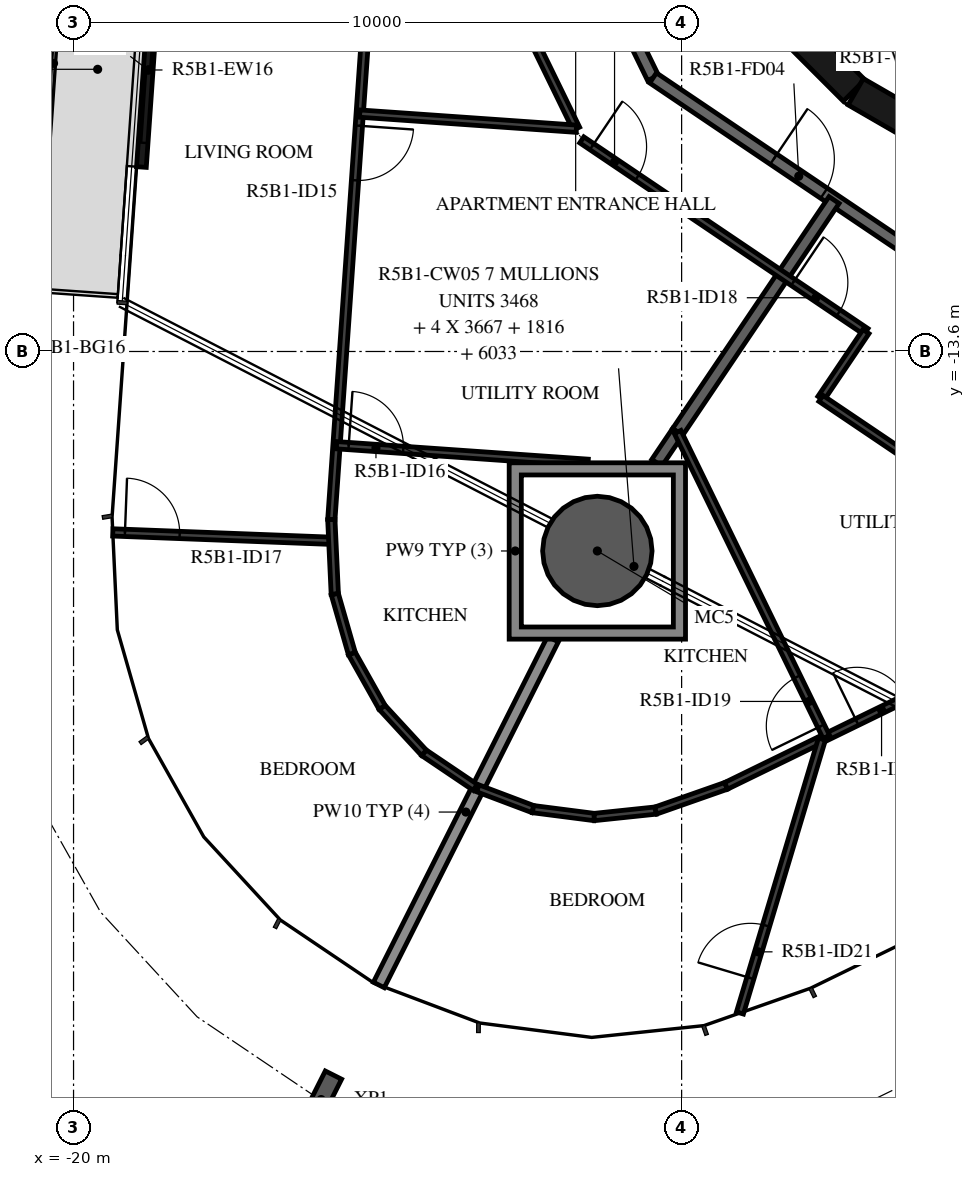
"""IFC4 building model, lengths in metres.
Left out: names, types, materials, properties, quantities, classifications, styles, units other than length and angle.
Written with IfcOpenShell. Run it as: python <this file> out.ifc"""

import sys

from ifc_helpers import new_model, si_unit, direction, frame, frame_2d, origin, origin_2d, place, context, subcontext, project, spatial, polyline, rectangle, hollow_circle, i_section, outline, extrude, element, fill, save


model = new_model("IFC4")
c1 = context("Model", 3, precision=1e-05, world=origin(), true_north=direction((0.0, 1.0)))
c2 = subcontext(c1, "Body", "Model", "MODEL_VIEW")
j1 = project(units=[si_unit("LENGTHUNIT", "METRE"), si_unit("PLANEANGLEUNIT", "RADIAN")], contexts=[c1])
p1 = place(None, origin())
s1 = spatial("IfcSite", under=j1, at=p1, CompositionType="ELEMENT")
p2 = place(p1, origin())
s2 = spatial("IfcBuilding", under=s1, at=p2, CompositionType="ELEMENT")
p3 = place(p2, frame((0.0, 0.0, 198.9)))
s3 = spatial("IfcBuildingStorey", under=s2, at=p3, CompositionType="ELEMENT", Elevation=198.9)
p4 = place(p3, frame((-11.386, -16.881, -0.38), z_axis=(0.0, 0.0, 1.0), x_axis=(1.0, 0.0, 0.0)))
e1 = element("IfcColumn", 1, at=p4, inside=s3, PredefinedType="COLUMN", context=c2, shape_type="SweptSolid", body=[
    extrude(hollow_circle(Radius=0.9, WallThickness=0.04, at=origin_2d()), origin(), (0.0, 0.0, 1.0), 3.5),
])
p5 = place(p3, frame((-15.928, -25.902, -0.38), z_axis=(0.0, 0.0, 1.0), x_axis=(-0.893169071277, 0.449721035881, 0.0)))
e2 = element("IfcColumn", 2, at=p5, inside=s3, PredefinedType="COLUMN", context=c2, shape_type="SweptSolid", body=[
    extrude(i_section(OverallWidth=0.3, OverallDepth=0.9, WebThickness=0.019, FlangeThickness=0.035, FilletRadius=0.03, at=origin_2d()), origin(), (0.0, 0.0, 1.0), 3.5),
])
p6 = place(p3, frame((-18.661, -7.375, 0.0), z_axis=(0.0, 0.0, 1.0), x_axis=(-0.069734222855, -0.997565605944, 0.0)))
e3 = element("IfcWall", 3, at=p6, inside=s3, PredefinedType="STANDARD", context=c2, shape_type="SweptSolid", body=[
    extrude(rectangle(XDim=3.2, YDim=0.16, at=frame_2d((1.6, 0.0))), origin(), (0.0, 0.0, 1.0), 3.12),
])
p7 = place(p6, frame((0.4, 0.0, 0.0)))
e4 = element("IfcOpeningElement", 4, at=p7, cuts=e3, PredefinedType="OPENING", context=c2, shape_type="SweptSolid", body=[
    extrude(rectangle(XDim=2.4, YDim=2.4, at=frame_2d((1.2, 1.2))), frame((0.0, 0.09, 0.0), z_axis=(0.0, -1.0, 0.0), x_axis=(1.0, 0.0, 0.0)), (0.0, 0.0, 1.0), 0.18),
])
p8 = place(p3, frame((-9.308, -7.164, 0.0), z_axis=(0.0, 0.0, 1.0), x_axis=(0.707106781187, -0.707106781187, 0.0)))
e5 = element("IfcWall", 5, at=p8, inside=s3, PredefinedType="SHEAR", context=c2, shape_type="SweptSolid", body=[
    extrude(rectangle(XDim=3.032, YDim=0.5, at=frame_2d((1.516, 0.0))), origin(), (0.0, 0.0, 1.0), 3.12),
])
p9 = place(p3, frame((-7.137, -9.329, 0.0), z_axis=(0.0, 0.0, 1.0), x_axis=(0.865975092491, -0.500087131594, 0.0)))
e6 = element("IfcWall", 6, at=p9, inside=s3, PredefinedType="SHEAR", context=c2, shape_type="SweptSolid", body=[
    extrude(rectangle(XDim=3.033, YDim=0.5, at=frame_2d((1.516, 0.0))), origin(), (0.0, 0.0, 1.0), 3.12),
])
p10 = place(p3, frame((-11.633, -6.716, 0.0), z_axis=(0.0, 0.0, 1.0), x_axis=(0.438322116278, -0.898817958422, 0.0)))
e7 = element("IfcWall", 7, at=p10, inside=s3, PredefinedType="STANDARD", context=c2, shape_type="SweptSolid", body=[
    extrude(rectangle(XDim=2.654, YDim=0.2, at=frame_2d((1.327, 0.0))), origin(), (0.0, 0.0, 1.0), 3.12),
])
p11 = place(p3, frame((-10.47, -9.101, 0.0), z_axis=(0.0, 0.0, 1.0), x_axis=(0.829035841718, -0.559195469534, 0.0)))
e8 = element("IfcWall", 8, at=p11, inside=s3, PredefinedType="STANDARD", context=c2, shape_type="SweptSolid", body=[
    extrude(rectangle(XDim=7.181, YDim=0.2, at=frame_2d((3.591, 0.0))), origin(), (0.0, 0.0, 1.0), 3.12),
])
p12 = place(p11, frame((2.39, 0.0, 0.0)))
e9 = element("IfcOpeningElement", 9, at=p12, cuts=e8, PredefinedType="OPENING", context=c2, shape_type="SweptSolid", body=[
    extrude(rectangle(XDim=1.0, YDim=2.1, at=frame_2d((0.5, 1.05))), frame((0.0, 0.11, 0.0), z_axis=(0.0, -1.0, 0.0), x_axis=(1.0, 0.0, 0.0)), (0.0, 0.0, 1.0), 0.22),
])
p13 = place(p3, frame((-10.066, -14.924, 0.0), z_axis=(0.0, 0.0, 1.0), x_axis=(0.559173899945, 0.829050390278, 0.0)))
e10 = element("IfcWall", 10, at=p13, inside=s3, PredefinedType="STANDARD", context=c2, shape_type="SweptSolid", body=[
    extrude(rectangle(XDim=4.601, YDim=0.2, at=frame_2d((2.301, 0.0))), origin(), (0.0, 0.0, 1.0), 3.12),
])
p14 = place(p3, frame((-10.408, -15.43, 0.0), z_axis=(0.0, 0.0, 1.0), x_axis=(0.559390561924, 0.828904215956, 0.0)))
e11 = element("IfcWall", 11, at=p14, inside=s3, PredefinedType="STANDARD", context=c2, shape_type="SweptSolid", body=[
    extrude(rectangle(XDim=0.612, YDim=0.2, at=frame_2d((0.306, 0.0))), origin(), (0.0, 0.0, 1.0), 3.12),
])
p15 = place(p3, frame((-14.979, -24.017, 0.0), z_axis=(0.0, 0.0, 1.0), x_axis=(0.449711952388, 0.893173644864, 0.0)))
e12 = element("IfcWall", 12, at=p15, inside=s3, PredefinedType="STANDARD", context=c2, shape_type="SweptSolid", body=[
    extrude(rectangle(XDim=6.367, YDim=0.2, at=frame_2d((3.184, 0.0))), origin(), (0.0, 0.0, 1.0), 2.73),
])
p16 = place(p3, frame((-14.383, -4.5, 0.0), z_axis=(0.0, 0.0, 1.0), x_axis=(0.438393414895, -0.898783185077, 0.0)))
e13 = element("IfcWall", 13, at=p16, inside=s3, PredefinedType="PARTITIONING", context=c2, shape_type="SweptSolid", body=[
    extrude(rectangle(XDim=6.049, YDim=0.12, at=frame_2d((3.024, 0.0))), origin(), (0.0, 0.0, 1.0), 3.12),
])
p17 = place(p16, frame((0.4, 0.0, 0.0)))
e14 = element("IfcOpeningElement", 14, at=p17, cuts=e13, PredefinedType="OPENING", context=c2, shape_type="SweptSolid", body=[
    extrude(rectangle(XDim=0.8, YDim=2.1, at=frame_2d((0.4, 1.05))), frame((0.0, 0.07, 0.0), z_axis=(0.0, -1.0, 0.0), x_axis=(1.0, 0.0, 0.0)), (0.0, 0.0, 1.0), 0.14),
])
p18 = place(p3, frame((-11.642, -10.12, 0.0), z_axis=(0.0, 0.0, 1.0), x_axis=(0.829033377599, -0.559199122698, 0.0)))
e15 = element("IfcWall", 15, at=p18, inside=s3, PredefinedType="PARTITIONING", context=c2, shape_type="SweptSolid", body=[
    extrude(rectangle(XDim=5.638, YDim=0.12, at=frame_2d((2.819, 0.0))), origin(), (0.0, 0.0, 1.0), 3.12),
])
p19 = place(p18, frame((0.2, 0.0, 0.0)))
e16 = element("IfcOpeningElement", 16, at=p19, cuts=e15, PredefinedType="OPENING", context=c2, shape_type="SweptSolid", body=[
    extrude(rectangle(XDim=0.9, YDim=2.1, at=frame_2d((0.45, 1.05))), frame((0.0, 0.07, 0.0), z_axis=(0.0, -1.0, 0.0), x_axis=(1.0, 0.0, 0.0)), (0.0, 0.0, 1.0), 0.14),
])
p20 = place(p18, frame((4.192, 0.0, 0.0)))
e17 = element("IfcOpeningElement", 17, at=p20, cuts=e15, PredefinedType="OPENING", context=c2, shape_type="SweptSolid", body=[
    extrude(rectangle(XDim=0.9, YDim=2.1, at=frame_2d((0.45, 1.05))), frame((0.0, 0.07, 0.0), z_axis=(0.0, -1.0, 0.0), x_axis=(1.0, 0.0, 0.0)), (0.0, 0.0, 1.0), 0.14),
])
p21 = place(p3, frame((-14.931, -4.5, 0.0), z_axis=(0.0, 0.0, 1.0), x_axis=(-0.069751708439, -0.997564383471, 0.0)))
e18 = element("IfcWall", 18, at=p21, inside=s3, PredefinedType="PARTITIONING", context=c2, shape_type="SweptSolid", body=[
    extrude(rectangle(XDim=11.894, YDim=0.12, at=frame_2d((5.947, 0.0))), origin(), (0.0, 0.0, 1.0), 3.12),
])
p22 = place(p21, frame((5.4, 0.0, 0.0)))
e19 = element("IfcOpeningElement", 19, at=p22, cuts=e18, PredefinedType="OPENING", context=c2, shape_type="SweptSolid", body=[
    extrude(rectangle(XDim=0.9, YDim=2.1, at=frame_2d((0.45, 1.05))), frame((0.0, 0.07, 0.0), z_axis=(0.0, -1.0, 0.0), x_axis=(1.0, 0.0, 0.0)), (0.0, 0.0, 1.0), 0.14),
])
p23 = place(p3, frame((-15.294, -9.688, 0.0), z_axis=(0.0, 0.0, 1.0), x_axis=(0.997565819809, -0.069731163391, 0.0)))
e20 = element("IfcWall", 20, at=p23, inside=s3, PredefinedType="PARTITIONING", context=c2, shape_type="SweptSolid", body=[
    extrude(rectangle(XDim=3.571, YDim=0.12, at=frame_2d((1.786, 0.0))), origin(), (0.0, 0.0, 1.0), 3.12),
])
p24 = place(p3, frame((-19.355, -16.575, 0.0), z_axis=(0.0, 0.0, 1.0), x_axis=(0.999268343647, -0.038246272823, 0.0)))
e21 = element("IfcWall", 21, at=p24, inside=s3, PredefinedType="PARTITIONING", context=c2, shape_type="SweptSolid", body=[
    extrude(rectangle(XDim=3.613, YDim=0.12, at=frame_2d((1.807, 0.0))), origin(), (0.0, 0.0, 1.0), 3.12),
])
p25 = place(p24, frame((0.2, 0.0, 0.0)))
e22 = element("IfcOpeningElement", 22, at=p25, cuts=e21, PredefinedType="OPENING", context=c2, shape_type="SweptSolid", body=[
    extrude(rectangle(XDim=0.9, YDim=2.1, at=frame_2d((0.45, 1.05))), frame((0.0, 0.07, 0.0), z_axis=(0.0, -1.0, 0.0), x_axis=(1.0, 0.0, 0.0)), (0.0, 0.0, 1.0), 0.14),
])
p26 = place(p3, frame((-15.704, -17.59, 0.0), z_axis=(0.0, 0.0, 1.0), x_axis=(-0.046364428258, 0.998924591645, 0.0)))
e23 = element("IfcWall", 23, at=p26, inside=s3, PredefinedType="PARTITIONING", context=c2, shape_type="SweptSolid", body=[
    extrude(rectangle(XDim=1.227, YDim=0.12, at=frame_2d((0.613, 0.0))), origin(), (0.0, 0.0, 1.0), 3.12),
])
p27 = place(p3, frame((-15.675, -15.141, 0.0), z_axis=(0.0, 0.0, 1.0), x_axis=(0.997563107735, -0.06976995117, 0.0)))
e24 = element("IfcWall", 24, at=p27, inside=s3, PredefinedType="PARTITIONING", context=c2, shape_type="SweptSolid", body=[
    extrude(rectangle(XDim=4.146, YDim=0.12, at=frame_2d((2.073, 0.0))), origin(), (0.0, 0.0, 1.0), 3.12),
])
p28 = place(p27, frame((0.2, 0.0, 0.0)))
e25 = element("IfcOpeningElement", 25, at=p28, cuts=e24, PredefinedType="OPENING", context=c2, shape_type="SweptSolid", body=[
    extrude(rectangle(XDim=0.9, YDim=2.1, at=frame_2d((0.45, 1.05))), frame((0.0, 0.07, 0.0), z_axis=(0.0, -1.0, 0.0), x_axis=(1.0, 0.0, 0.0)), (0.0, 0.0, 1.0), 0.14),
])
for number, where, z_axis, x_axis in (
    (26, (-13.395, -20.767, 0.0), (0.0, 0.0, 1.0), (-0.829, 0.559, 0.0)),
    (27, (-14.237, -20.199, 0.0), (0.0, 0.0, 1.0), (-0.678, 0.735, 0.0)),
):
    element("IfcWall", number, at=place(p3, frame(where, z_axis=z_axis, x_axis=x_axis)), inside=s3, PredefinedType="PARTITIONING", context=c2, shape_type="SweptSolid", body=[
        extrude(rectangle(XDim=1.016, YDim=0.12, at=frame_2d((0.508, 0.0))), origin(), (0.0, 0.0, 1.0), 3.12),
    ])
p29 = place(p3, frame((-14.926, -19.452, 0.0), z_axis=(0.0, 0.0, 1.0), x_axis=(-0.489941776958, 0.871755157823, 0.0)))
e28 = element("IfcWall", 28, at=p29, inside=s3, PredefinedType="PARTITIONING", context=c2, shape_type="SweptSolid", body=[
    extrude(rectangle(XDim=1.016, YDim=0.12, at=frame_2d((0.508, 0.0))), origin(), (0.0, 0.0, 1.0), 3.12),
])
p30 = place(p3, frame((-15.424, -18.567, 0.0), z_axis=(0.0, 0.0, 1.0), x_axis=(-0.275641454312, 0.961260520704, 0.0)))
e29 = element("IfcWall", 29, at=p30, inside=s3, PredefinedType="PARTITIONING", context=c2, shape_type="SweptSolid", body=[
    extrude(rectangle(XDim=1.016, YDim=0.12, at=frame_2d((0.508, 0.0))), origin(), (0.0, 0.0, 1.0), 3.12),
])
p31 = place(p3, frame((-6.968, -13.273, 0.0), z_axis=(0.0, 0.0, 1.0), x_axis=(-0.559283007371, -0.828976789582, 0.0)))
e30 = element("IfcWall", 30, at=p31, inside=s3, PredefinedType="PARTITIONING", context=c2, shape_type="SweptSolid", body=[
    extrude(rectangle(XDim=1.325, YDim=0.12, at=frame_2d((0.663, 0.0))), origin(), (0.0, 0.0, 1.0), 3.12),
])
p32 = place(p3, frame((-7.709, -14.371, 0.0), z_axis=(0.0, 0.0, 1.0), x_axis=(0.829033422808, -0.559199055675, 0.0)))
e31 = element("IfcWall", 31, at=p32, inside=s3, PredefinedType="PARTITIONING", context=c2, shape_type="SweptSolid", body=[
    extrude(rectangle(XDim=1.7, YDim=0.12, at=frame_2d((0.85, 0.0))), origin(), (0.0, 0.0, 1.0), 3.12),
])
p33 = place(p3, frame((-13.351, -20.784, 0.0), z_axis=(0.0, 0.0, 1.0), x_axis=(0.935644105077, -0.352944908781, 0.0)))
e32 = element("IfcWall", 32, at=p33, inside=s3, PredefinedType="PARTITIONING", context=c2, shape_type="SweptSolid", body=[
    extrude(rectangle(XDim=0.969, YDim=0.12, at=frame_2d((0.484, 0.0))), origin(), (0.0, 0.0, 1.0), 3.12),
])
p34 = place(p3, frame((-12.445, -21.126, 0.0), z_axis=(0.0, 0.0, 1.0), x_axis=(0.991824046735, -0.127612931625, 0.0)))
e33 = element("IfcWall", 33, at=p34, inside=s3, PredefinedType="PARTITIONING", context=c2, shape_type="SweptSolid", body=[
    extrude(rectangle(XDim=1.016, YDim=0.12, at=frame_2d((0.508, 0.0))), origin(), (0.0, 0.0, 1.0), 3.12),
])
p35 = place(p3, frame((-11.437, -21.256, 0.0), z_axis=(0.0, 0.0, 1.0), x_axis=(0.994522555527, 0.104522182086, 0.0)))
e34 = element("IfcWall", 34, at=p35, inside=s3, PredefinedType="PARTITIONING", context=c2, shape_type="SweptSolid", body=[
    extrude(rectangle(XDim=1.016, YDim=0.12, at=frame_2d((0.508, 0.0))), origin(), (0.0, 0.0, 1.0), 3.12),
])
p36 = place(p3, frame((-10.427, -21.149, 0.0), z_axis=(0.0, 0.0, 1.0), x_axis=(0.943591256744, 0.331112579338, 0.0)))
e35 = element("IfcWall", 35, at=p36, inside=s3, PredefinedType="PARTITIONING", context=c2, shape_type="SweptSolid", body=[
    extrude(rectangle(XDim=1.227, YDim=0.12, at=frame_2d((0.613, 0.0))), origin(), (0.0, 0.0, 1.0), 3.12),
])
p37 = place(p3, frame((-9.269, -20.743, 0.0), z_axis=(0.0, 0.0, 1.0), x_axis=(0.898796865831, 0.438365365846, 0.0)))
e36 = element("IfcWall", 36, at=p37, inside=s3, PredefinedType="PARTITIONING", context=c2, shape_type="SweptSolid", body=[
    extrude(rectangle(XDim=12.879, YDim=0.12, at=frame_2d((6.439, 0.0))), origin(), (0.0, 0.0, 1.0), 3.12),
])
p38 = place(p37, frame((2.395, 0.0, 0.0)))
e37 = element("IfcOpeningElement", 37, at=p38, cuts=e36, PredefinedType="OPENING", context=c2, shape_type="SweptSolid", body=[
    extrude(rectangle(XDim=0.9, YDim=2.1, at=frame_2d((0.45, 1.05))), frame((0.0, 0.07, 0.0), z_axis=(0.0, -1.0, 0.0), x_axis=(1.0, 0.0, 0.0)), (0.0, 0.0, 1.0), 0.14),
])
p39 = place(p3, frame((-7.62, -19.939, 0.0), z_axis=(0.0, 0.0, 1.0), x_axis=(-0.438353807908, 0.89880250283, 0.0)))
e38 = element("IfcWall", 38, at=p39, inside=s3, PredefinedType="PARTITIONING", context=c2, shape_type="SweptSolid", body=[
    extrude(rectangle(XDim=5.58, YDim=0.12, at=frame_2d((2.79, 0.0))), origin(), (0.0, 0.0, 1.0), 3.12),
])
p40 = place(p39, frame((0.2, 0.0, 0.0)))
e39 = element("IfcOpeningElement", 39, at=p40, cuts=e38, PredefinedType="OPENING", context=c2, shape_type="SweptSolid", body=[
    extrude(rectangle(XDim=0.9, YDim=2.1, at=frame_2d((0.45, 1.05))), frame((0.0, 0.07, 0.0), z_axis=(0.0, -1.0, 0.0), x_axis=(1.0, 0.0, 0.0)), (0.0, 0.0, 1.0), 0.14),
])
p41 = place(p3, frame((-9.041, -24.479, 0.0), z_axis=(0.0, 0.0, 1.0), x_axis=(0.286804727102, 0.957989064923, 0.0)))
e40 = element("IfcWall", 40, at=p41, inside=s3, PredefinedType="PARTITIONING", context=c2, shape_type="SweptSolid", body=[
    extrude(rectangle(XDim=4.701, YDim=0.12, at=frame_2d((2.351, 0.0))), origin(), (0.0, 0.0, 1.0), 3.12),
])
p42 = place(p41, frame((0.6, 0.0, 0.0)))
e41 = element("IfcOpeningElement", 41, at=p42, cuts=e40, PredefinedType="OPENING", context=c2, shape_type="SweptSolid", body=[
    extrude(rectangle(XDim=0.9, YDim=2.1, at=frame_2d((0.45, 1.05))), frame((0.0, 0.07, 0.0), z_axis=(0.0, -1.0, 0.0), x_axis=(1.0, 0.0, 0.0)), (0.0, 0.0, 1.0), 0.14),
])
p43 = place(p3, origin())
e42 = element("IfcWall", 42, at=p43, inside=s3, PredefinedType="STANDARD", context=c2, shape_type="SweptSolid", body=[
    extrude(outline(polyline([(-9.936, -15.43), (-9.936, -18.331), (-12.836, -18.331), (-12.836, -15.43), (-9.936, -15.43)]), holes=[polyline([(-12.636, -18.131), (-10.136, -18.131), (-10.136, -15.631), (-12.636, -15.631), (-12.636, -18.131)])]), origin(), (0.0, 0.0, 1.0), 3.12),
])
p44 = place(p7, origin())
e43 = element("IfcDoor", 43, at=p44, inside=s3, OperationType="DOUBLE_DOOR_SLIDING", PredefinedType="DOOR", context=c2, shape_type="SweptSolid", body=[
    extrude(rectangle(XDim=2.4, YDim=2.4, at=frame_2d((1.2, 1.2))), frame((0.0, 0.025, 0.0), z_axis=(0.0, -1.0, 0.0), x_axis=(1.0, 0.0, 0.0)), (0.0, 0.0, 1.0), 0.05),
])
fill(e4, e43)
p45 = place(p12, origin())
e44 = element("IfcDoor", 44, at=p45, inside=s3, OperationType="SINGLE_SWING_RIGHT", PredefinedType="DOOR", context=c2, shape_type="SweptSolid", body=[
    extrude(rectangle(XDim=1.0, YDim=2.1, at=frame_2d((0.5, 1.05))), frame((0.0, 0.025, 0.0), z_axis=(0.0, -1.0, 0.0), x_axis=(1.0, 0.0, 0.0)), (0.0, 0.0, 1.0), 0.05),
])
fill(e9, e44)
p46 = place(p19, origin())
e45 = element("IfcDoor", 45, at=p46, inside=s3, OperationType="SINGLE_SWING_RIGHT", PredefinedType="DOOR", context=c2, shape_type="SweptSolid", body=[
    extrude(rectangle(XDim=0.9, YDim=2.1, at=frame_2d((0.45, 1.05))), frame((0.0, 0.025, 0.0), z_axis=(0.0, -1.0, 0.0), x_axis=(1.0, 0.0, 0.0)), (0.0, 0.0, 1.0), 0.05),
])
fill(e16, e45)
p47 = place(p22, origin())
e46 = element("IfcDoor", 46, at=p47, inside=s3, OperationType="SINGLE_SWING_RIGHT", PredefinedType="DOOR", context=c2, shape_type="SweptSolid", body=[
    extrude(rectangle(XDim=0.9, YDim=2.1, at=frame_2d((0.45, 1.05))), frame((0.0, 0.025, 0.0), z_axis=(0.0, -1.0, 0.0), x_axis=(1.0, 0.0, 0.0)), (0.0, 0.0, 1.0), 0.05),
])
fill(e19, e46)
p48 = place(p28, origin())
e47 = element("IfcDoor", 47, at=p48, inside=s3, OperationType="SINGLE_SWING_RIGHT", PredefinedType="DOOR", context=c2, shape_type="SweptSolid", body=[
    extrude(rectangle(XDim=0.9, YDim=2.1, at=frame_2d((0.45, 1.05))), frame((0.0, 0.025, 0.0), z_axis=(0.0, -1.0, 0.0), x_axis=(1.0, 0.0, 0.0)), (0.0, 0.0, 1.0), 0.05),
])
fill(e25, e47)
p49 = place(p25, origin())
e48 = element("IfcDoor", 48, at=p49, inside=s3, OperationType="SINGLE_SWING_RIGHT", PredefinedType="DOOR", context=c2, shape_type="SweptSolid", body=[
    extrude(rectangle(XDim=0.9, YDim=2.1, at=frame_2d((0.45, 1.05))), frame((0.0, 0.025, 0.0), z_axis=(0.0, -1.0, 0.0), x_axis=(1.0, 0.0, 0.0)), (0.0, 0.0, 1.0), 0.05),
])
fill(e22, e48)
p50 = place(p20, origin())
e49 = element("IfcDoor", 49, at=p50, inside=s3, OperationType="SINGLE_SWING_LEFT", PredefinedType="DOOR", context=c2, shape_type="SweptSolid", body=[
    extrude(rectangle(XDim=0.9, YDim=2.1, at=frame_2d((0.45, 1.05))), frame((0.0, 0.025, 0.0), z_axis=(0.0, -1.0, 0.0), x_axis=(1.0, 0.0, 0.0)), (0.0, 0.0, 1.0), 0.05),
])
fill(e17, e49)
p51 = place(p40, origin())
e50 = element("IfcDoor", 50, at=p51, inside=s3, OperationType="SINGLE_SWING_LEFT", PredefinedType="DOOR", context=c2, shape_type="SweptSolid", body=[
    extrude(rectangle(XDim=0.9, YDim=2.1, at=frame_2d((0.45, 1.05))), frame((0.0, 0.025, 0.0), z_axis=(0.0, -1.0, 0.0), x_axis=(1.0, 0.0, 0.0)), (0.0, 0.0, 1.0), 0.05),
])
fill(e39, e50)
p52 = place(p38, origin())
e51 = element("IfcDoor", 51, at=p52, inside=s3, OperationType="SINGLE_SWING_LEFT", PredefinedType="DOOR", context=c2, shape_type="SweptSolid", body=[
    extrude(rectangle(XDim=0.9, YDim=2.1, at=frame_2d((0.45, 1.05))), frame((0.0, 0.025, 0.0), z_axis=(0.0, -1.0, 0.0), x_axis=(1.0, 0.0, 0.0)), (0.0, 0.0, 1.0), 0.05),
])
fill(e37, e51)
p53 = place(p42, origin())
e52 = element("IfcDoor", 52, at=p53, inside=s3, OperationType="SINGLE_SWING_LEFT", PredefinedType="DOOR", context=c2, shape_type="SweptSolid", body=[
    extrude(rectangle(XDim=0.9, YDim=2.1, at=frame_2d((0.45, 1.05))), frame((0.0, 0.025, 0.0), z_axis=(0.0, -1.0, 0.0), x_axis=(1.0, 0.0, 0.0)), (0.0, 0.0, 1.0), 0.05),
])
fill(e41, e52)
save(model, sys.argv[1])
